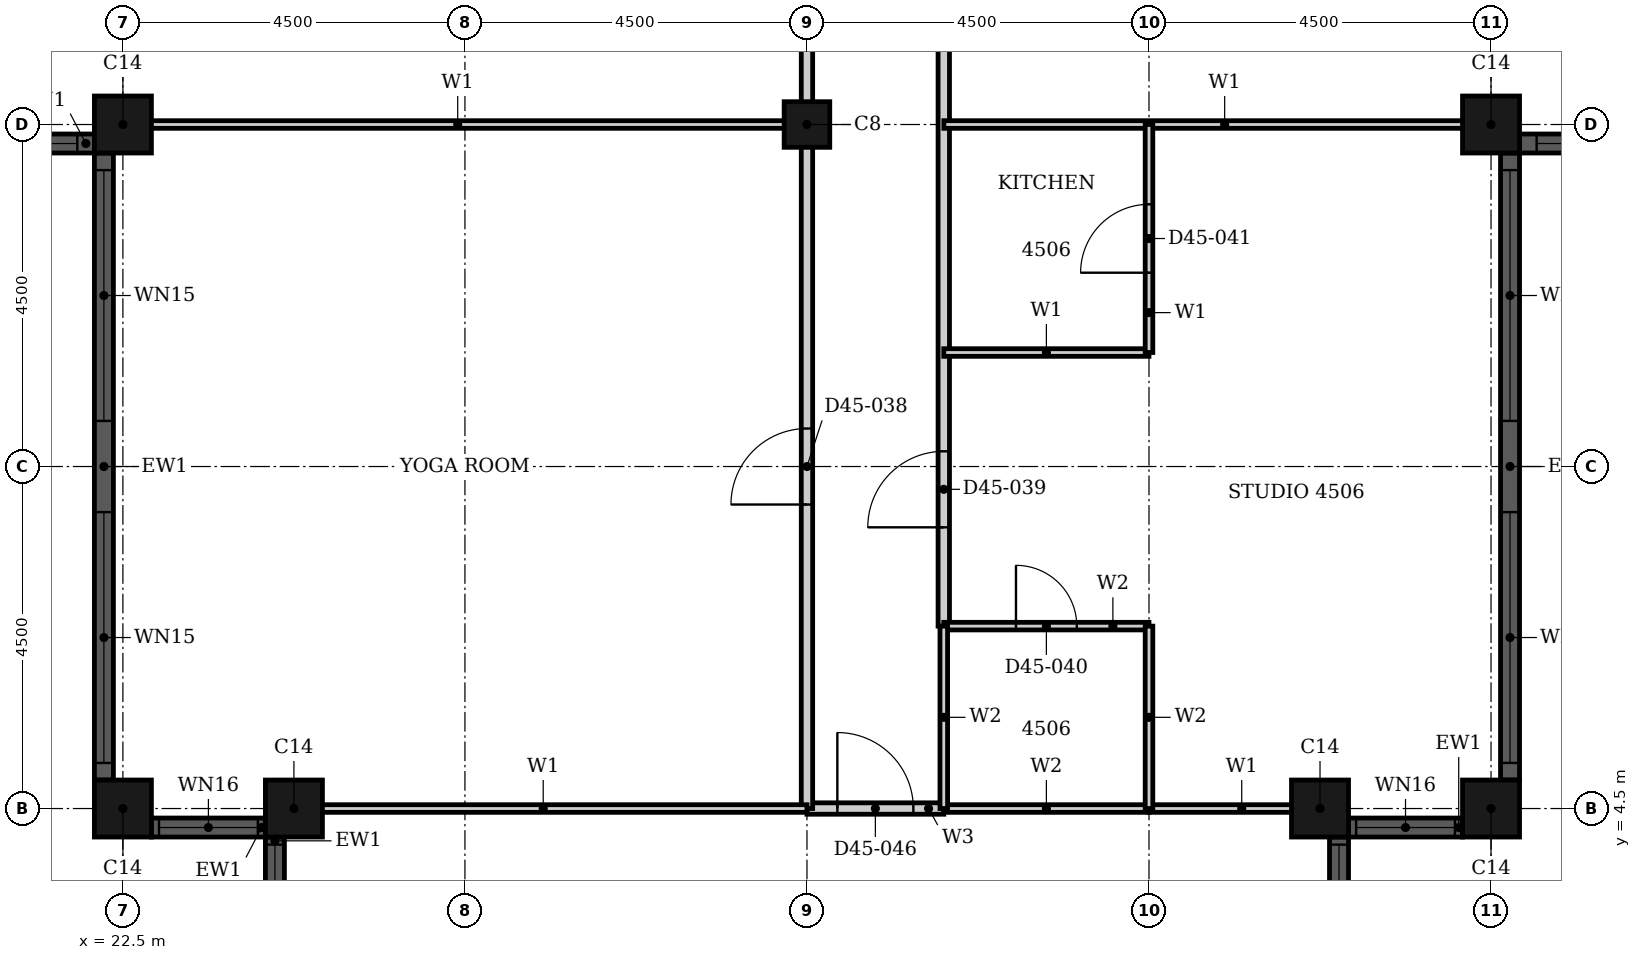
"""IFC4 building model, lengths in metres.
Left out: names, types, materials, properties, quantities, classifications, styles, units other than length and angle.
Written with IfcOpenShell. Run it as: python <this file> out.ifc"""

import sys

from ifc_helpers import new_model, si_unit, direction, frame, frame_2d, origin, origin_2d, place, context, subcontext, project, spatial, rectangle, hollow_rectangle, extrude, element, fill, save


model = new_model("IFC4")
c1 = context("Model", 3, precision=1e-05, world=origin(), true_north=direction((0.0, 1.0)))
c2 = subcontext(c1, "Body", "Model", "MODEL_VIEW")
j1 = project(units=[si_unit("LENGTHUNIT", "METRE"), si_unit("PLANEANGLEUNIT", "RADIAN")], contexts=[c1])
p1 = place(None, origin())
s1 = spatial("IfcSite", under=j1, at=p1, CompositionType="ELEMENT")
p2 = place(p1, origin())
s2 = spatial("IfcBuilding", under=s1, at=p2, CompositionType="ELEMENT")
p3 = place(p2, frame((0.0, 0.0, 180.2)))
s3 = spatial("IfcBuildingStorey", under=s2, at=p3, CompositionType="ELEMENT", Elevation=180.2)
for number, where, z_axis, x_axis in (
    (1, (22.5, 4.5, 0.0), (0.0, 0.0, 1.0), (1.0, 0.0, 0.0)),
    (2, (24.75, 4.5, 0.0), (0.0, 0.0, 1.0), (1.0, 0.0, 0.0)),
    (3, (38.25, 4.5, 0.0), (0.0, 0.0, 1.0), (1.0, 0.0, 0.0)),
    (4, (40.5, 4.5, 0.0), (0.0, 0.0, 1.0), (1.0, 0.0, 0.0)),
    (5, (40.5, 13.5, 0.0), (0.0, 0.0, 1.0), (1.0, 0.0, 0.0)),
    (6, (22.5, 13.5, 0.0), (0.0, 0.0, 1.0), (1.0, 0.0, 0.0)),
):
    element("IfcColumn", number, at=place(p3, frame(where, z_axis=z_axis, x_axis=x_axis)), inside=s3, PredefinedType="COLUMN", context=c2, shape_type="SweptSolid", body=[
        extrude(hollow_rectangle(XDim=0.75, YDim=0.75, WallThickness=0.024, at=origin_2d()), origin(), (0.0, 0.0, 1.0), 3.7),
    ])
p4 = place(p3, frame((31.5, 13.5, 0.0), z_axis=(0.0, 0.0, 1.0), x_axis=(1.0, 0.0, 0.0)))
e7 = element("IfcColumn", 7, at=p4, inside=s3, PredefinedType="COLUMN", context=c2, shape_type="SweptSolid", body=[
    extrude(hollow_rectangle(XDim=0.6, YDim=0.6, WallThickness=0.02, at=origin_2d()), origin(), (0.0, 0.0, 1.0), 3.7),
])
p5 = place(p3, frame((22.875, 4.25, 0.0), z_axis=(0.0, 0.0, 1.0), x_axis=(1.0, 0.0, 0.0)))
e8 = element("IfcWall", 8, at=p5, inside=s3, PredefinedType="SOLIDWALL", context=c2, shape_type="SweptSolid", body=[
    extrude(rectangle(XDim=1.5, YDim=0.25, at=frame_2d((0.75, 0.0))), origin(), (0.0, 0.0, 1.0), 3.7),
])
p6 = place(p5, frame((0.1, 0.0, 0.9)))
e9 = element("IfcOpeningElement", 9, at=p6, cuts=e8, PredefinedType="OPENING", context=c2, shape_type="SweptSolid", body=[
    extrude(rectangle(XDim=1.3, YDim=1.85, at=frame_2d((0.65, 0.925))), frame((0.0, 0.135, 0.0), z_axis=(0.0, -1.0, 0.0), x_axis=(1.0, 0.0, 0.0)), (0.0, 0.0, 1.0), 0.27),
])
p7 = place(p3, frame((24.5, 4.125, 0.0), z_axis=(0.0, 0.0, 1.0), x_axis=(0.0, -1.0, 0.0)))
e10 = element("IfcWall", 10, at=p7, inside=s3, PredefinedType="SOLIDWALL", context=c2, shape_type="SweptSolid", body=[
    extrude(rectangle(XDim=1.5, YDim=0.25, at=frame_2d((0.75, 0.0))), origin(), (0.0, 0.0, 1.0), 3.7),
])
p8 = place(p7, frame((0.1, 0.0, 0.9)))
e11 = element("IfcOpeningElement", 11, at=p8, cuts=e10, PredefinedType="OPENING", context=c2, shape_type="SweptSolid", body=[
    extrude(rectangle(XDim=1.3, YDim=1.85, at=frame_2d((0.65, 0.925))), frame((0.0, 0.135, 0.0), z_axis=(0.0, -1.0, 0.0), x_axis=(1.0, 0.0, 0.0)), (0.0, 0.0, 1.0), 0.27),
])
p9 = place(p3, frame((38.5, 2.625, 0.0), z_axis=(0.0, 0.0, 1.0), x_axis=(0.0, 1.0, 0.0)))
e12 = element("IfcWall", 12, at=p9, inside=s3, PredefinedType="SOLIDWALL", context=c2, shape_type="SweptSolid", body=[
    extrude(rectangle(XDim=1.5, YDim=0.25, at=frame_2d((0.75, 0.0))), origin(), (0.0, 0.0, 1.0), 3.7),
])
p10 = place(p9, frame((0.1, 0.0, 0.9)))
e13 = element("IfcOpeningElement", 13, at=p10, cuts=e12, PredefinedType="OPENING", context=c2, shape_type="SweptSolid", body=[
    extrude(rectangle(XDim=1.3, YDim=1.85, at=frame_2d((0.65, 0.925))), frame((0.0, 0.135, 0.0), z_axis=(0.0, -1.0, 0.0), x_axis=(1.0, 0.0, 0.0)), (0.0, 0.0, 1.0), 0.27),
])
p11 = place(p3, frame((38.625, 4.25, 0.0), z_axis=(0.0, 0.0, 1.0), x_axis=(1.0, 0.0, 0.0)))
e14 = element("IfcWall", 14, at=p11, inside=s3, PredefinedType="SOLIDWALL", context=c2, shape_type="SweptSolid", body=[
    extrude(rectangle(XDim=1.5, YDim=0.25, at=frame_2d((0.75, 0.0))), origin(), (0.0, 0.0, 1.0), 3.7),
])
p12 = place(p11, frame((0.1, 0.0, 0.9)))
e15 = element("IfcOpeningElement", 15, at=p12, cuts=e14, PredefinedType="OPENING", context=c2, shape_type="SweptSolid", body=[
    extrude(rectangle(XDim=1.3, YDim=1.85, at=frame_2d((0.65, 0.925))), frame((0.0, 0.135, 0.0), z_axis=(0.0, -1.0, 0.0), x_axis=(1.0, 0.0, 0.0)), (0.0, 0.0, 1.0), 0.27),
])
p13 = place(p3, frame((40.75, 4.875, 0.0), z_axis=(0.0, 0.0, 1.0), x_axis=(0.0, 1.0, 0.0)))
e16 = element("IfcWall", 16, at=p13, inside=s3, PredefinedType="SOLIDWALL", context=c2, shape_type="SweptSolid", body=[
    extrude(rectangle(XDim=8.25, YDim=0.25, at=frame_2d((4.125, 0.0))), origin(), (0.0, 0.0, 1.0), 3.7),
])
p14 = place(p13, frame((0.225, 0.0, 0.45)))
e17 = element("IfcOpeningElement", 17, at=p14, cuts=e16, PredefinedType="OPENING", context=c2, shape_type="SweptSolid", body=[
    extrude(rectangle(XDim=3.3, YDim=2.3, at=frame_2d((1.65, 1.15))), frame((0.0, 0.135, 0.0), z_axis=(0.0, -1.0, 0.0), x_axis=(1.0, 0.0, 0.0)), (0.0, 0.0, 1.0), 0.27),
])
p15 = place(p13, frame((4.725, 0.0, 0.45)))
e18 = element("IfcOpeningElement", 18, at=p15, cuts=e16, PredefinedType="OPENING", context=c2, shape_type="SweptSolid", body=[
    extrude(rectangle(XDim=3.3, YDim=2.3, at=frame_2d((1.65, 1.15))), frame((0.0, 0.135, 0.0), z_axis=(0.0, -1.0, 0.0), x_axis=(1.0, 0.0, 0.0)), (0.0, 0.0, 1.0), 0.27),
])
p16 = place(p3, frame((40.875, 13.25, 0.0), z_axis=(0.0, 0.0, 1.0), x_axis=(1.0, 0.0, 0.0)))
e19 = element("IfcWall", 19, at=p16, inside=s3, PredefinedType="SOLIDWALL", context=c2, shape_type="SweptSolid", body=[
    extrude(rectangle(XDim=3.75, YDim=0.25, at=frame_2d((1.875, 0.0))), origin(), (0.0, 0.0, 1.0), 3.7),
])
p17 = place(p16, frame((0.225, 0.0, 0.45)))
e20 = element("IfcOpeningElement", 20, at=p17, cuts=e19, PredefinedType="OPENING", context=c2, shape_type="SweptSolid", body=[
    extrude(rectangle(XDim=3.3, YDim=2.3, at=frame_2d((1.65, 1.15))), frame((0.0, 0.135, 0.0), z_axis=(0.0, -1.0, 0.0), x_axis=(1.0, 0.0, 0.0)), (0.0, 0.0, 1.0), 0.27),
])
p18 = place(p3, frame((18.375, 13.25, 0.0), z_axis=(0.0, 0.0, 1.0), x_axis=(1.0, 0.0, 0.0)))
e21 = element("IfcWall", 21, at=p18, inside=s3, PredefinedType="SOLIDWALL", context=c2, shape_type="SweptSolid", body=[
    extrude(rectangle(XDim=3.75, YDim=0.25, at=frame_2d((1.875, 0.0))), origin(), (0.0, 0.0, 1.0), 3.7),
])
p19 = place(p18, frame((0.225, 0.0, 0.45)))
e22 = element("IfcOpeningElement", 22, at=p19, cuts=e21, PredefinedType="OPENING", context=c2, shape_type="SweptSolid", body=[
    extrude(rectangle(XDim=3.3, YDim=2.3, at=frame_2d((1.65, 1.15))), frame((0.0, 0.135, 0.0), z_axis=(0.0, -1.0, 0.0), x_axis=(1.0, 0.0, 0.0)), (0.0, 0.0, 1.0), 0.27),
])
p20 = place(p3, frame((22.25, 13.125, 0.0), z_axis=(0.0, 0.0, 1.0), x_axis=(0.0, -1.0, 0.0)))
e23 = element("IfcWall", 23, at=p20, inside=s3, PredefinedType="SOLIDWALL", context=c2, shape_type="SweptSolid", body=[
    extrude(rectangle(XDim=8.25, YDim=0.25, at=frame_2d((4.125, 0.0))), origin(), (0.0, 0.0, 1.0), 3.7),
])
p21 = place(p20, frame((0.225, 0.0, 0.45)))
e24 = element("IfcOpeningElement", 24, at=p21, cuts=e23, PredefinedType="OPENING", context=c2, shape_type="SweptSolid", body=[
    extrude(rectangle(XDim=3.3, YDim=2.3, at=frame_2d((1.65, 1.15))), frame((0.0, 0.135, 0.0), z_axis=(0.0, -1.0, 0.0), x_axis=(1.0, 0.0, 0.0)), (0.0, 0.0, 1.0), 0.27),
])
p22 = place(p20, frame((4.725, 0.0, 0.45)))
e25 = element("IfcOpeningElement", 25, at=p22, cuts=e23, PredefinedType="OPENING", context=c2, shape_type="SweptSolid", body=[
    extrude(rectangle(XDim=3.3, YDim=2.3, at=frame_2d((1.65, 1.15))), frame((0.0, 0.135, 0.0), z_axis=(0.0, -1.0, 0.0), x_axis=(1.0, 0.0, 0.0)), (0.0, 0.0, 1.0), 0.27),
])
p23 = place(p3, frame((31.5, 4.5, 0.0), z_axis=(0.0, 0.0, 1.0), x_axis=(1.0, 0.0, 0.0)))
e26 = element("IfcWall", 26, at=p23, inside=s3, PredefinedType="PARTITIONING", context=c2, shape_type="SweptSolid", body=[
    extrude(rectangle(XDim=1.8, YDim=0.15, at=frame_2d((0.9, 0.0))), origin(), (0.0, 0.0, 1.0), 3.4),
])
p24 = place(p23, frame((0.4, 0.0, 0.0)))
e27 = element("IfcOpeningElement", 27, at=p24, cuts=e26, PredefinedType="OPENING", context=c2, shape_type="SweptSolid", body=[
    extrude(rectangle(XDim=1.0, YDim=2.1, at=frame_2d((0.5, 1.05))), frame((0.0, 0.085, 0.0), z_axis=(0.0, -1.0, 0.0), x_axis=(1.0, 0.0, 0.0)), (0.0, 0.0, 1.0), 0.17),
])
p25 = place(p3, frame((31.5, 4.5, 0.0), z_axis=(0.0, 0.0, 1.0), x_axis=(0.0, 1.0, 0.0)))
e28 = element("IfcWall", 28, at=p25, inside=s3, PredefinedType="PARTITIONING", context=c2, shape_type="SweptSolid", body=[
    extrude(rectangle(XDim=16.2, YDim=0.15, at=frame_2d((8.1, 0.0))), origin(), (0.0, 0.0, 1.0), 2.68),
])
p26 = place(p25, frame((4.0, 0.0, 0.0)))
e29 = element("IfcOpeningElement", 29, at=p26, cuts=e28, PredefinedType="OPENING", context=c2, shape_type="SweptSolid", body=[
    extrude(rectangle(XDim=1.0, YDim=2.1, at=frame_2d((0.5, 1.05))), frame((0.0, 0.085, 0.0), z_axis=(0.0, -1.0, 0.0), x_axis=(1.0, 0.0, 0.0)), (0.0, 0.0, 1.0), 0.17),
])
p27 = place(p3, frame((33.3, 6.9, 0.0), z_axis=(0.0, 0.0, 1.0), x_axis=(0.0, 1.0, 0.0)))
e30 = element("IfcWall", 30, at=p27, inside=s3, PredefinedType="PARTITIONING", context=c2, shape_type="SweptSolid", body=[
    extrude(rectangle(XDim=13.799, YDim=0.15, at=frame_2d((6.899, 0.0))), origin(), (0.0, 0.0, 1.0), 3.4),
])
p28 = place(p27, frame((1.3, 0.0, 0.0)))
e31 = element("IfcOpeningElement", 31, at=p28, cuts=e30, PredefinedType="OPENING", context=c2, shape_type="SweptSolid", body=[
    extrude(rectangle(XDim=1.0, YDim=2.2, at=frame_2d((0.5, 1.1))), frame((0.0, 0.085, 0.0), z_axis=(0.0, -1.0, 0.0), x_axis=(1.0, 0.0, 0.0)), (0.0, 0.0, 1.0), 0.17),
])
p29 = place(p3, frame((33.3, 10.5, 0.0), z_axis=(0.0, 0.0, 1.0), x_axis=(1.0, 0.0, 0.0)))
e32 = element("IfcWall", 32, at=p29, inside=s3, PredefinedType="PARTITIONING", context=c2, shape_type="SweptSolid", body=[
    extrude(rectangle(XDim=2.7, YDim=0.1, at=frame_2d((1.35, 0.0))), origin(), (0.0, 0.0, 1.0), 3.4),
])
p30 = place(p3, frame((33.301, 13.5, 0.0), z_axis=(0.0, 0.0, 1.0), x_axis=(1.0, 0.0, 0.0)))
e33 = element("IfcWall", 33, at=p30, inside=s3, PredefinedType="PARTITIONING", context=c2, shape_type="SweptSolid", body=[
    extrude(rectangle(XDim=7.389, YDim=0.1, at=frame_2d((3.694, 0.0))), origin(), (0.0, 0.0, 1.0), 2.48),
])
p31 = place(p3, frame((22.31, 13.5, 0.0), z_axis=(0.0, 0.0, 1.0), x_axis=(1.0, 0.0, 0.0)))
e34 = element("IfcWall", 34, at=p31, inside=s3, PredefinedType="PARTITIONING", context=c2, shape_type="SweptSolid", body=[
    extrude(rectangle(XDim=9.19, YDim=0.1, at=frame_2d((4.595, 0.0))), origin(), (0.0, 0.0, 1.0), 2.48),
])
p32 = place(p3, frame((36.0, 4.5, 0.0), z_axis=(0.0, 0.0, 1.0), x_axis=(1.0, 0.0, 0.0)))
e35 = element("IfcWall", 35, at=p32, inside=s3, PredefinedType="PARTITIONING", context=c2, shape_type="SweptSolid", body=[
    extrude(rectangle(XDim=2.44, YDim=0.1, at=frame_2d((1.22, 0.0))), origin(), (0.0, 0.0, 1.0), 3.4),
])
p33 = place(p3, frame((24.56, 4.5, 0.0), z_axis=(0.0, 0.0, 1.0), x_axis=(1.0, 0.0, 0.0)))
e36 = element("IfcWall", 36, at=p33, inside=s3, PredefinedType="PARTITIONING", context=c2, shape_type="SweptSolid", body=[
    extrude(rectangle(XDim=6.94, YDim=0.1, at=frame_2d((3.47, 0.0))), origin(), (0.0, 0.0, 1.0), 3.4),
])
p34 = place(p3, frame((36.0, 10.5, 0.0), z_axis=(0.0, 0.0, 1.0), x_axis=(0.0, 1.0, 0.0)))
e37 = element("IfcWall", 37, at=p34, inside=s3, PredefinedType="PARTITIONING", context=c2, shape_type="SweptSolid", body=[
    extrude(rectangle(XDim=3.0, YDim=0.1, at=frame_2d((1.5, 0.0))), origin(), (0.0, 0.0, 1.0), 2.68),
])
p35 = place(p34, frame((1.05, 0.0, 0.0)))
e38 = element("IfcOpeningElement", 38, at=p35, cuts=e37, PredefinedType="OPENING", context=c2, shape_type="SweptSolid", body=[
    extrude(rectangle(XDim=0.9, YDim=2.1, at=frame_2d((0.45, 1.05))), frame((0.0, 0.06, 0.0), z_axis=(0.0, -1.0, 0.0), x_axis=(1.0, 0.0, 0.0)), (0.0, 0.0, 1.0), 0.12),
])
p36 = place(p3, frame((33.3, 4.5, 0.0), z_axis=(0.0, 0.0, 1.0), x_axis=(1.0, 0.0, 0.0)))
e39 = element("IfcWall", 39, at=p36, inside=s3, PredefinedType="PARTITIONING", context=c2, shape_type="SweptSolid", body=[
    extrude(rectangle(XDim=2.7, YDim=0.1, at=frame_2d((1.35, 0.0))), origin(), (0.0, 0.0, 1.0), 3.4),
])
p37 = place(p3, frame((33.3, 6.9, 0.0), z_axis=(0.0, 0.0, 1.0), x_axis=(1.0, 0.0, 0.0)))
e40 = element("IfcWall", 40, at=p37, inside=s3, PredefinedType="PARTITIONING", context=c2, shape_type="SweptSolid", body=[
    extrude(rectangle(XDim=2.7, YDim=0.1, at=frame_2d((1.35, 0.0))), origin(), (0.0, 0.0, 1.0), 3.4),
])
p38 = place(p37, frame((0.95, 0.0, 0.0)))
e41 = element("IfcOpeningElement", 41, at=p38, cuts=e40, PredefinedType="OPENING", context=c2, shape_type="SweptSolid", body=[
    extrude(rectangle(XDim=0.8, YDim=2.1, at=frame_2d((0.4, 1.05))), frame((0.0, 0.06, 0.0), z_axis=(0.0, -1.0, 0.0), x_axis=(1.0, 0.0, 0.0)), (0.0, 0.0, 1.0), 0.12),
])
p39 = place(p3, frame((33.3, 4.5, 0.0), z_axis=(0.0, 0.0, 1.0), x_axis=(0.0, 1.0, 0.0)))
e42 = element("IfcWall", 42, at=p39, inside=s3, PredefinedType="PARTITIONING", context=c2, shape_type="SweptSolid", body=[
    extrude(rectangle(XDim=2.4, YDim=0.1, at=frame_2d((1.2, 0.0))), origin(), (0.0, 0.0, 1.0), 3.4),
])
p40 = place(p3, frame((36.0, 4.5, 0.0), z_axis=(0.0, 0.0, 1.0), x_axis=(0.0, 1.0, 0.0)))
e43 = element("IfcWall", 43, at=p40, inside=s3, PredefinedType="PARTITIONING", context=c2, shape_type="SweptSolid", body=[
    extrude(rectangle(XDim=2.4, YDim=0.1, at=frame_2d((1.2, 0.0))), origin(), (0.0, 0.0, 1.0), 2.68),
])
p41 = place(p6, origin())
e44 = element("IfcWindow", 44, at=p41, inside=s3, PartitioningType="SINGLE_PANEL", PredefinedType="WINDOW", context=c2, shape_type="SweptSolid", body=[
    extrude(rectangle(XDim=1.3, YDim=1.85, at=frame_2d((0.65, 0.925))), frame((0.0, 0.03, 0.0), z_axis=(0.0, -1.0, 0.0), x_axis=(1.0, 0.0, 0.0)), (0.0, 0.0, 1.0), 0.06),
])
fill(e9, e44)
p42 = place(p8, origin())
e45 = element("IfcWindow", 45, at=p42, inside=s3, PartitioningType="SINGLE_PANEL", PredefinedType="WINDOW", context=c2, shape_type="SweptSolid", body=[
    extrude(rectangle(XDim=1.3, YDim=1.85, at=frame_2d((0.65, 0.925))), frame((0.0, 0.03, 0.0), z_axis=(0.0, -1.0, 0.0), x_axis=(1.0, 0.0, 0.0)), (0.0, 0.0, 1.0), 0.06),
])
fill(e11, e45)
p43 = place(p10, origin())
e46 = element("IfcWindow", 46, at=p43, inside=s3, PartitioningType="SINGLE_PANEL", PredefinedType="WINDOW", context=c2, shape_type="SweptSolid", body=[
    extrude(rectangle(XDim=1.3, YDim=1.85, at=frame_2d((0.65, 0.925))), frame((0.0, 0.03, 0.0), z_axis=(0.0, -1.0, 0.0), x_axis=(1.0, 0.0, 0.0)), (0.0, 0.0, 1.0), 0.06),
])
fill(e13, e46)
p44 = place(p12, origin())
e47 = element("IfcWindow", 47, at=p44, inside=s3, PartitioningType="SINGLE_PANEL", PredefinedType="WINDOW", context=c2, shape_type="SweptSolid", body=[
    extrude(rectangle(XDim=1.3, YDim=1.85, at=frame_2d((0.65, 0.925))), frame((0.0, 0.03, 0.0), z_axis=(0.0, -1.0, 0.0), x_axis=(1.0, 0.0, 0.0)), (0.0, 0.0, 1.0), 0.06),
])
fill(e15, e47)
p45 = place(p14, origin())
e48 = element("IfcWindow", 48, at=p45, inside=s3, PartitioningType="SINGLE_PANEL", PredefinedType="WINDOW", context=c2, shape_type="SweptSolid", body=[
    extrude(rectangle(XDim=3.3, YDim=2.3, at=frame_2d((1.65, 1.15))), frame((0.0, 0.03, 0.0), z_axis=(0.0, -1.0, 0.0), x_axis=(1.0, 0.0, 0.0)), (0.0, 0.0, 1.0), 0.06),
])
fill(e17, e48)
p46 = place(p15, origin())
e49 = element("IfcWindow", 49, at=p46, inside=s3, PartitioningType="SINGLE_PANEL", PredefinedType="WINDOW", context=c2, shape_type="SweptSolid", body=[
    extrude(rectangle(XDim=3.3, YDim=2.3, at=frame_2d((1.65, 1.15))), frame((0.0, 0.03, 0.0), z_axis=(0.0, -1.0, 0.0), x_axis=(1.0, 0.0, 0.0)), (0.0, 0.0, 1.0), 0.06),
])
fill(e18, e49)
p47 = place(p17, origin())
e50 = element("IfcWindow", 50, at=p47, inside=s3, PartitioningType="SINGLE_PANEL", PredefinedType="WINDOW", context=c2, shape_type="SweptSolid", body=[
    extrude(rectangle(XDim=3.3, YDim=2.3, at=frame_2d((1.65, 1.15))), frame((0.0, 0.03, 0.0), z_axis=(0.0, -1.0, 0.0), x_axis=(1.0, 0.0, 0.0)), (0.0, 0.0, 1.0), 0.06),
])
fill(e20, e50)
p48 = place(p19, origin())
e51 = element("IfcWindow", 51, at=p48, inside=s3, PartitioningType="SINGLE_PANEL", PredefinedType="WINDOW", context=c2, shape_type="SweptSolid", body=[
    extrude(rectangle(XDim=3.3, YDim=2.3, at=frame_2d((1.65, 1.15))), frame((0.0, 0.03, 0.0), z_axis=(0.0, -1.0, 0.0), x_axis=(1.0, 0.0, 0.0)), (0.0, 0.0, 1.0), 0.06),
])
fill(e22, e51)
p49 = place(p21, origin())
e52 = element("IfcWindow", 52, at=p49, inside=s3, PartitioningType="SINGLE_PANEL", PredefinedType="WINDOW", context=c2, shape_type="SweptSolid", body=[
    extrude(rectangle(XDim=3.3, YDim=2.3, at=frame_2d((1.65, 1.15))), frame((0.0, 0.03, 0.0), z_axis=(0.0, -1.0, 0.0), x_axis=(1.0, 0.0, 0.0)), (0.0, 0.0, 1.0), 0.06),
])
fill(e24, e52)
p50 = place(p22, origin())
e53 = element("IfcWindow", 53, at=p50, inside=s3, PartitioningType="SINGLE_PANEL", PredefinedType="WINDOW", context=c2, shape_type="SweptSolid", body=[
    extrude(rectangle(XDim=3.3, YDim=2.3, at=frame_2d((1.65, 1.15))), frame((0.0, 0.03, 0.0), z_axis=(0.0, -1.0, 0.0), x_axis=(1.0, 0.0, 0.0)), (0.0, 0.0, 1.0), 0.06),
])
fill(e25, e53)
p51 = place(p26, origin())
e54 = element("IfcDoor", 54, at=p51, inside=s3, OperationType="SINGLE_SWING_LEFT", PredefinedType="DOOR", context=c2, shape_type="SweptSolid", body=[
    extrude(rectangle(XDim=1.0, YDim=2.1, at=frame_2d((0.5, 1.05))), frame((0.0, 0.025, 0.0), z_axis=(0.0, -1.0, 0.0), x_axis=(1.0, 0.0, 0.0)), (0.0, 0.0, 1.0), 0.05),
])
fill(e29, e54)
p52 = place(p28, origin())
e55 = element("IfcDoor", 55, at=p52, inside=s3, OperationType="SINGLE_SWING_RIGHT", PredefinedType="DOOR", context=c2, shape_type="SweptSolid", body=[
    extrude(rectangle(XDim=1.0, YDim=2.2, at=frame_2d((0.5, 1.1))), frame((0.0, 0.025, 0.0), z_axis=(0.0, -1.0, 0.0), x_axis=(1.0, 0.0, 0.0)), (0.0, 0.0, 1.0), 0.05),
])
fill(e31, e55)
p53 = place(p38, origin())
e56 = element("IfcDoor", 56, at=p53, inside=s3, OperationType="SINGLE_SWING_LEFT", PredefinedType="DOOR", context=c2, shape_type="SweptSolid", body=[
    extrude(rectangle(XDim=0.8, YDim=2.1, at=frame_2d((0.4, 1.05))), frame((0.0, 0.025, 0.0), z_axis=(0.0, -1.0, 0.0), x_axis=(1.0, 0.0, 0.0)), (0.0, 0.0, 1.0), 0.05),
])
fill(e41, e56)
p54 = place(p35, origin())
e57 = element("IfcDoor", 57, at=p54, inside=s3, OperationType="SINGLE_SWING_LEFT", PredefinedType="DOOR", context=c2, shape_type="SweptSolid", body=[
    extrude(rectangle(XDim=0.9, YDim=2.1, at=frame_2d((0.45, 1.05))), frame((0.0, 0.025, 0.0), z_axis=(0.0, -1.0, 0.0), x_axis=(1.0, 0.0, 0.0)), (0.0, 0.0, 1.0), 0.05),
])
fill(e38, e57)
p55 = place(p24, origin())
e58 = element("IfcDoor", 58, at=p55, inside=s3, OperationType="SINGLE_SWING_RIGHT", PredefinedType="DOOR", context=c2, shape_type="SweptSolid", body=[
    extrude(rectangle(XDim=1.0, YDim=2.1, at=frame_2d((0.5, 1.05))), frame((0.0, 0.025, 0.0), z_axis=(0.0, -1.0, 0.0), x_axis=(1.0, 0.0, 0.0)), (0.0, 0.0, 1.0), 0.05),
])
fill(e27, e58)
save(model, sys.argv[1])
